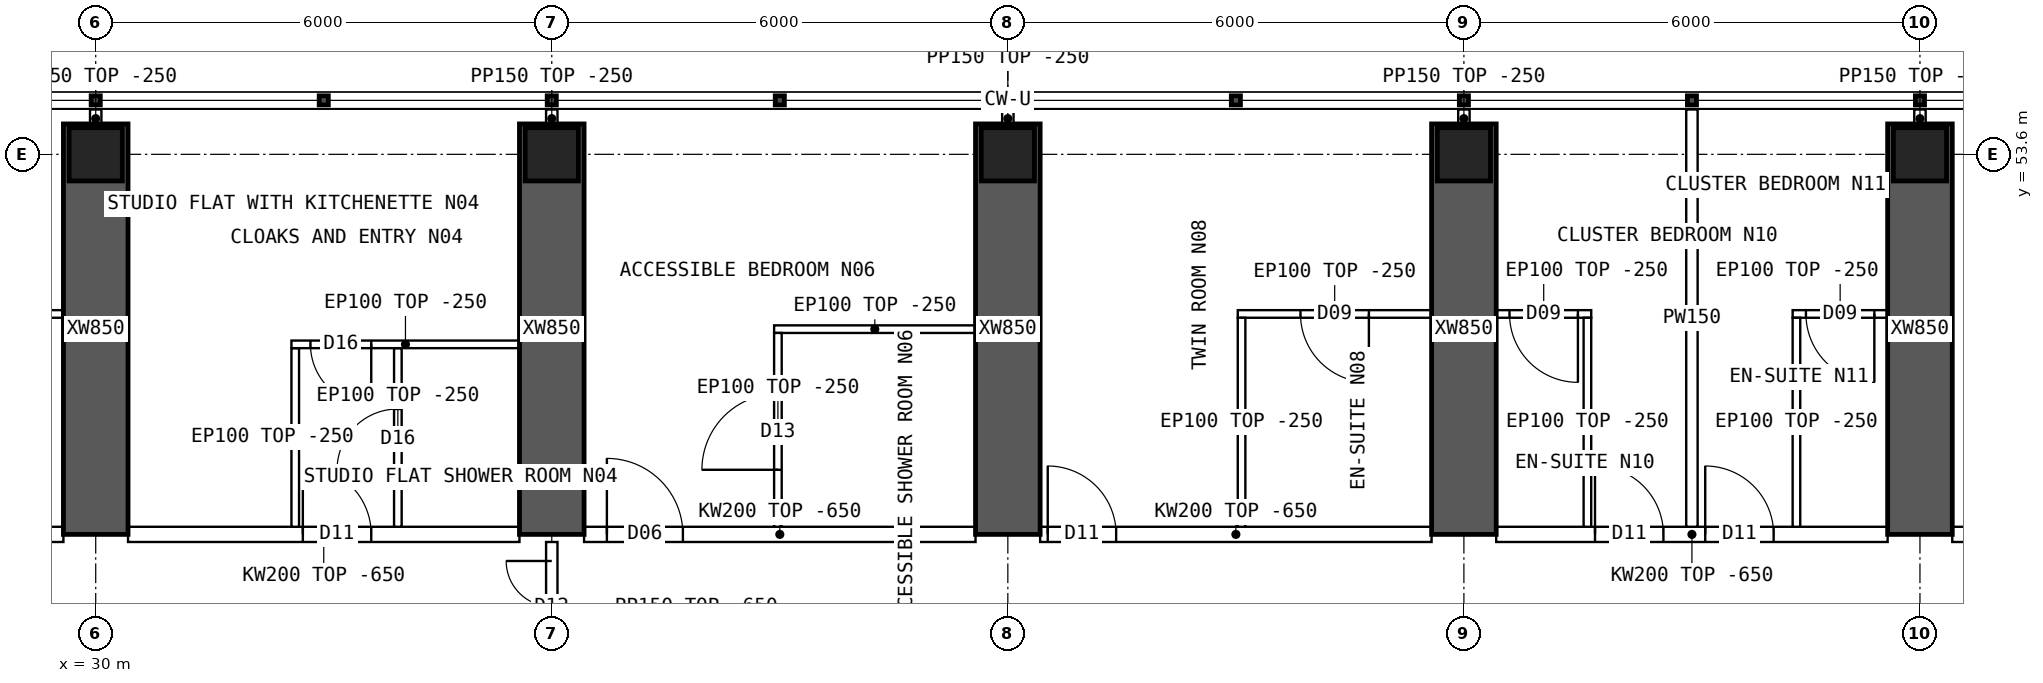
"""IFC4 building model, lengths in metres.
Left out: names, types, materials, properties, quantities, classifications, styles, units other than length and angle.
Written with IfcOpenShell. Run it as: python <this file> out.ifc"""

import sys

from ifc_helpers import new_model, si_unit, direction, frame, frame_2d, origin, origin_2d, place, context, subcontext, project, spatial, polyline, rectangle, hollow_rectangle, outline, extrude, element, fill, save


model = new_model("IFC4")
c1 = context("Model", 3, precision=1e-05, world=origin(), true_north=direction((0.0, 1.0)))
c2 = subcontext(c1, "Body", "Model", "MODEL_VIEW")
j1 = project(units=[si_unit("LENGTHUNIT", "METRE"), si_unit("PLANEANGLEUNIT", "RADIAN")], contexts=[c1])
p1 = place(None, origin())
s1 = spatial("IfcSite", under=j1, at=p1, CompositionType="ELEMENT")
p2 = place(p1, origin())
s2 = spatial("IfcBuilding", under=s1, at=p2, CompositionType="ELEMENT")
p3 = place(p2, frame((0.0, 0.0, 171.1)))
s3 = spatial("IfcBuildingStorey", under=s2, at=p3, CompositionType="ELEMENT", Elevation=171.1)
for number, where, z_axis, x_axis in (
    (1, (30.0, 53.6, 0.0), (0.0, 0.0, 1.0), (1.0, 0.0, 0.0)),
    (2, (36.0, 53.6, 0.0), (0.0, 0.0, 1.0), (1.0, 0.0, 0.0)),
    (3, (42.0, 53.6, 0.0), (0.0, 0.0, 1.0), (1.0, 0.0, 0.0)),
    (4, (48.0, 53.6, 0.0), (0.0, 0.0, 1.0), (1.0, 0.0, 0.0)),
    (5, (54.0, 53.6, 0.0), (0.0, 0.0, 1.0), (1.0, 0.0, 0.0)),
):
    element("IfcColumn", number, at=place(p3, frame(where, z_axis=z_axis, x_axis=x_axis)), inside=s3, PredefinedType="COLUMN", context=c2, shape_type="SweptSolid", body=[
        extrude(hollow_rectangle(XDim=0.7, YDim=0.7, WallThickness=0.07, at=origin_2d()), origin(), (0.0, 0.0, 1.0), 3.75),
    ])
for number, where, z_axis, x_axis in (
    (6, (30.0, 48.6, 0.0), (0.0, 0.0, 1.0), (0.0, 1.0, 0.0)),
    (7, (36.0, 48.6, 0.0), (0.0, 0.0, 1.0), (0.0, 1.0, 0.0)),
    (8, (42.0, 48.6, 0.0), (0.0, 0.0, 1.0), (0.0, 1.0, 0.0)),
    (9, (48.0, 48.6, 0.0), (0.0, 0.0, 1.0), (0.0, 1.0, 0.0)),
    (10, (54.0, 48.6, 0.0), (0.0, 0.0, 1.0), (0.0, 1.0, 0.0)),
):
    element("IfcWall", number, at=place(p3, frame(where, z_axis=z_axis, x_axis=x_axis)), inside=s3, PredefinedType="SHEAR", context=c2, shape_type="SweptSolid", body=[
        extrude(rectangle(XDim=5.4, YDim=0.85, at=frame_2d((2.7, 0.0))), origin(), (0.0, 0.0, 1.0), 3.75),
    ])
p4 = place(p3, frame((24.425, 48.6, 0.0), z_axis=(0.0, 0.0, 1.0), x_axis=(1.0, 0.0, 0.0)))
e11 = element("IfcWall", 11, at=p4, inside=s3, PredefinedType="SOLIDWALL", context=c2, shape_type="SweptSolid", body=[
    extrude(outline(polyline([(0.0, 0.0), (5.15, 0.0), (5.15, 3.1), (0.0, 3.1), (0.0, 0.0)])), frame((0.0, 0.1, 0.0), z_axis=(0.0, -1.0, 0.0), x_axis=(1.0, 0.0, 0.0)), (0.0, 0.0, 1.0), 0.2),
])
p5 = place(p4, frame((0.1, 0.0, 0.0)))
e12 = element("IfcOpeningElement", 12, at=p5, cuts=e11, PredefinedType="OPENING", context=c2, shape_type="SweptSolid", body=[
    extrude(rectangle(XDim=0.9, YDim=2.1, at=frame_2d((0.45, 1.05))), frame((0.0, 0.11, 0.0), z_axis=(0.0, -1.0, 0.0), x_axis=(1.0, 0.0, 0.0)), (0.0, 0.0, 1.0), 0.22),
])
p6 = place(p3, frame((30.425, 48.6, 0.0), z_axis=(0.0, 0.0, 1.0), x_axis=(1.0, 0.0, 0.0)))
e13 = element("IfcWall", 13, at=p6, inside=s3, PredefinedType="SOLIDWALL", context=c2, shape_type="SweptSolid", body=[
    extrude(outline(polyline([(0.0, 0.0), (5.15, 0.0), (5.15, 3.1), (0.0, 3.1), (0.0, 0.0)])), frame((0.0, 0.1, 0.0), z_axis=(0.0, -1.0, 0.0), x_axis=(1.0, 0.0, 0.0)), (0.0, 0.0, 1.0), 0.2),
])
p7 = place(p6, frame((2.3, 0.0, 0.0)))
e14 = element("IfcOpeningElement", 14, at=p7, cuts=e13, PredefinedType="OPENING", context=c2, shape_type="SweptSolid", body=[
    extrude(rectangle(XDim=0.9, YDim=2.1, at=frame_2d((0.45, 1.05))), frame((0.0, 0.11, 0.0), z_axis=(0.0, -1.0, 0.0), x_axis=(1.0, 0.0, 0.0)), (0.0, 0.0, 1.0), 0.22),
])
p8 = place(p3, frame((36.425, 48.6, 0.0), z_axis=(0.0, 0.0, 1.0), x_axis=(1.0, 0.0, 0.0)))
e15 = element("IfcWall", 15, at=p8, inside=s3, PredefinedType="SOLIDWALL", context=c2, shape_type="SweptSolid", body=[
    extrude(outline(polyline([(0.0, 0.0), (5.15, 0.0), (5.15, 3.1), (0.0, 3.1), (0.0, 0.0)])), frame((0.0, 0.1, 0.0), z_axis=(0.0, -1.0, 0.0), x_axis=(1.0, 0.0, 0.0)), (0.0, 0.0, 1.0), 0.2),
])
p9 = place(p8, frame((0.3, 0.0, 0.0)))
e16 = element("IfcOpeningElement", 16, at=p9, cuts=e15, PredefinedType="OPENING", context=c2, shape_type="SweptSolid", body=[
    extrude(rectangle(XDim=1.0, YDim=2.1, at=frame_2d((0.5, 1.05))), frame((0.0, 0.11, 0.0), z_axis=(0.0, -1.0, 0.0), x_axis=(1.0, 0.0, 0.0)), (0.0, 0.0, 1.0), 0.22),
])
p10 = place(p3, frame((42.425, 48.6, 0.0), z_axis=(0.0, 0.0, 1.0), x_axis=(1.0, 0.0, 0.0)))
e17 = element("IfcWall", 17, at=p10, inside=s3, PredefinedType="SOLIDWALL", context=c2, shape_type="SweptSolid", body=[
    extrude(outline(polyline([(0.0, 0.0), (5.15, 0.0), (5.15, 3.1), (0.0, 3.1), (0.0, 0.0)])), frame((0.0, 0.1, 0.0), z_axis=(0.0, -1.0, 0.0), x_axis=(1.0, 0.0, 0.0)), (0.0, 0.0, 1.0), 0.2),
])
p11 = place(p10, frame((0.1, 0.0, 0.0)))
e18 = element("IfcOpeningElement", 18, at=p11, cuts=e17, PredefinedType="OPENING", context=c2, shape_type="SweptSolid", body=[
    extrude(rectangle(XDim=0.9, YDim=2.1, at=frame_2d((0.45, 1.05))), frame((0.0, 0.11, 0.0), z_axis=(0.0, -1.0, 0.0), x_axis=(1.0, 0.0, 0.0)), (0.0, 0.0, 1.0), 0.22),
])
p12 = place(p3, frame((48.425, 48.6, 0.0), z_axis=(0.0, 0.0, 1.0), x_axis=(1.0, 0.0, 0.0)))
e19 = element("IfcWall", 19, at=p12, inside=s3, PredefinedType="SOLIDWALL", context=c2, shape_type="SweptSolid", body=[
    extrude(outline(polyline([(0.0, 0.0), (5.15, 0.0), (5.15, 3.1), (0.0, 3.1), (0.0, 0.0)])), frame((0.0, 0.1, 0.0), z_axis=(0.0, -1.0, 0.0), x_axis=(1.0, 0.0, 0.0)), (0.0, 0.0, 1.0), 0.2),
])
p13 = place(p12, frame((1.3, 0.0, 0.0)))
e20 = element("IfcOpeningElement", 20, at=p13, cuts=e19, PredefinedType="OPENING", context=c2, shape_type="SweptSolid", body=[
    extrude(rectangle(XDim=0.9, YDim=2.1, at=frame_2d((0.45, 1.05))), frame((0.0, 0.11, 0.0), z_axis=(0.0, -1.0, 0.0), x_axis=(1.0, 0.0, 0.0)), (0.0, 0.0, 1.0), 0.22),
])
p14 = place(p12, frame((2.75, 0.0, 0.0)))
e21 = element("IfcOpeningElement", 21, at=p14, cuts=e19, PredefinedType="OPENING", context=c2, shape_type="SweptSolid", body=[
    extrude(rectangle(XDim=0.9, YDim=2.1, at=frame_2d((0.45, 1.05))), frame((0.0, 0.11, 0.0), z_axis=(0.0, -1.0, 0.0), x_axis=(1.0, 0.0, 0.0)), (0.0, 0.0, 1.0), 0.22),
])
p15 = place(p3, frame((54.425, 48.6, 0.0), z_axis=(0.0, 0.0, 1.0), x_axis=(1.0, 0.0, 0.0)))
e22 = element("IfcWall", 22, at=p15, inside=s3, PredefinedType="SOLIDWALL", context=c2, shape_type="SweptSolid", body=[
    extrude(outline(polyline([(0.0, 0.0), (5.15, 0.0), (5.15, 3.1), (0.0, 3.1), (0.0, 0.0)])), frame((0.0, 0.1, 0.0), z_axis=(0.0, -1.0, 0.0), x_axis=(1.0, 0.0, 0.0)), (0.0, 0.0, 1.0), 0.2),
])
p16 = place(p15, frame((0.6, 0.0, 0.0)))
e23 = element("IfcOpeningElement", 23, at=p16, cuts=e22, PredefinedType="OPENING", context=c2, shape_type="SweptSolid", body=[
    extrude(rectangle(XDim=1.0, YDim=2.1, at=frame_2d((0.5, 1.05))), frame((0.0, 0.11, 0.0), z_axis=(0.0, -1.0, 0.0), x_axis=(1.0, 0.0, 0.0)), (0.0, 0.0, 1.0), 0.22),
])
p17 = place(p3, frame((27.025, 51.5, 0.0), z_axis=(0.0, 0.0, 1.0), x_axis=(1.0, 0.0, 0.0)))
e24 = element("IfcWall", 24, at=p17, inside=s3, PredefinedType="PARTITIONING", context=c2, shape_type="SweptSolid", body=[
    extrude(rectangle(XDim=2.55, YDim=0.1, at=frame_2d((1.275, 0.0))), origin(), (0.0, 0.0, 1.0), 3.5),
])
p18 = place(p17, frame((0.825, 0.0, 0.0)))
e25 = element("IfcOpeningElement", 25, at=p18, cuts=e24, PredefinedType="OPENING", context=c2, shape_type="SweptSolid", body=[
    extrude(rectangle(XDim=0.9, YDim=2.1, at=frame_2d((0.45, 1.05))), frame((0.0, 0.06, 0.0), z_axis=(0.0, -1.0, 0.0), x_axis=(1.0, 0.0, 0.0)), (0.0, 0.0, 1.0), 0.12),
])
p19 = place(p3, frame((32.575, 51.1, 0.0), z_axis=(0.0, 0.0, 1.0), x_axis=(1.0, 0.0, 0.0)))
e26 = element("IfcWall", 26, at=p19, inside=s3, PredefinedType="PARTITIONING", context=c2, shape_type="SweptSolid", body=[
    extrude(rectangle(XDim=3.0, YDim=0.1, at=frame_2d((1.5, 0.0))), origin(), (0.0, 0.0, 1.0), 3.5),
])
p20 = place(p19, frame((0.25, 0.0, 0.0)))
e27 = element("IfcOpeningElement", 27, at=p20, cuts=e26, PredefinedType="OPENING", context=c2, shape_type="SweptSolid", body=[
    extrude(rectangle(XDim=0.8, YDim=2.1, at=frame_2d((0.4, 1.05))), frame((0.0, 0.06, 0.0), z_axis=(0.0, -1.0, 0.0), x_axis=(1.0, 0.0, 0.0)), (0.0, 0.0, 1.0), 0.12),
])
p21 = place(p3, frame((32.625, 51.05, 0.0), z_axis=(0.0, 0.0, 1.0), x_axis=(0.0, -1.0, 0.0)))
e28 = element("IfcWall", 28, at=p21, inside=s3, PredefinedType="PARTITIONING", context=c2, shape_type="SweptSolid", body=[
    extrude(outline(polyline([(0.0, 0.0), (2.35, 0.0), (2.35, 3.1), (2.302, 3.1), (2.3, 3.5), (0.0, 3.5), (0.0, 0.0)])), frame((0.0, 0.05, 0.0), z_axis=(0.0, -1.0, 0.0), x_axis=(1.0, 0.0, 0.0)), (0.0, 0.0, 1.0), 0.1),
])
p22 = place(p3, frame((33.975, 51.05, 0.0), z_axis=(0.0, 0.0, 1.0), x_axis=(0.0, -1.0, 0.0)))
e29 = element("IfcWall", 29, at=p22, inside=s3, PredefinedType="PARTITIONING", context=c2, shape_type="SweptSolid", body=[
    extrude(outline(polyline([(0.0, 0.0), (2.35, 0.0), (2.35, 3.1), (2.302, 3.1), (2.3, 3.5), (0.0, 3.5), (0.0, 0.0)])), frame((0.0, 0.05, 0.0), z_axis=(0.0, -1.0, 0.0), x_axis=(1.0, 0.0, 0.0)), (0.0, 0.0, 1.0), 0.1),
])
p23 = place(p22, frame((0.8, 0.0, 0.0)))
e30 = element("IfcOpeningElement", 30, at=p23, cuts=e29, PredefinedType="OPENING", context=c2, shape_type="SweptSolid", body=[
    extrude(rectangle(XDim=0.8, YDim=2.1, at=frame_2d((0.4, 1.05))), frame((0.0, 0.06, 0.0), z_axis=(0.0, -1.0, 0.0), x_axis=(1.0, 0.0, 0.0)), (0.0, 0.0, 1.0), 0.12),
])
p24 = place(p3, frame((38.925, 51.3, 0.0), z_axis=(0.0, 0.0, 1.0), x_axis=(1.0, 0.0, 0.0)))
e31 = element("IfcWall", 31, at=p24, inside=s3, PredefinedType="PARTITIONING", context=c2, shape_type="SweptSolid", body=[
    extrude(rectangle(XDim=2.65, YDim=0.1, at=frame_2d((1.325, 0.0))), origin(), (0.0, 0.0, 1.0), 3.5),
])
p25 = place(p3, frame((38.975, 51.25, 0.0), z_axis=(0.0, 0.0, 1.0), x_axis=(0.0, -1.0, 0.0)))
e32 = element("IfcWall", 32, at=p25, inside=s3, PredefinedType="PARTITIONING", context=c2, shape_type="SweptSolid", body=[
    extrude(outline(polyline([(0.0, 0.0), (2.55, 0.0), (2.55, 3.1), (2.502, 3.1), (2.5, 3.5), (0.0, 3.5), (0.0, 0.0)])), frame((0.0, 0.05, 0.0), z_axis=(0.0, -1.0, 0.0), x_axis=(1.0, 0.0, 0.0)), (0.0, 0.0, 1.0), 0.1),
])
p26 = place(p25, frame((0.8, 0.0, 0.0)))
e33 = element("IfcOpeningElement", 33, at=p26, cuts=e32, PredefinedType="OPENING", context=c2, shape_type="SweptSolid", body=[
    extrude(rectangle(XDim=1.0, YDim=2.1, at=frame_2d((0.5, 1.05))), frame((0.0, 0.06, 0.0), z_axis=(0.0, -1.0, 0.0), x_axis=(1.0, 0.0, 0.0)), (0.0, 0.0, 1.0), 0.12),
])
p27 = place(p3, frame((45.025, 51.5, 0.0), z_axis=(0.0, 0.0, 1.0), x_axis=(1.0, 0.0, 0.0)))
e34 = element("IfcWall", 34, at=p27, inside=s3, PredefinedType="PARTITIONING", context=c2, shape_type="SweptSolid", body=[
    extrude(rectangle(XDim=2.55, YDim=0.1, at=frame_2d((1.275, 0.0))), origin(), (0.0, 0.0, 1.0), 3.5),
])
p28 = place(p27, frame((0.825, 0.0, 0.0)))
e35 = element("IfcOpeningElement", 35, at=p28, cuts=e34, PredefinedType="OPENING", context=c2, shape_type="SweptSolid", body=[
    extrude(rectangle(XDim=0.9, YDim=2.1, at=frame_2d((0.45, 1.05))), frame((0.0, 0.06, 0.0), z_axis=(0.0, -1.0, 0.0), x_axis=(1.0, 0.0, 0.0)), (0.0, 0.0, 1.0), 0.12),
])
p29 = place(p3, frame((45.075, 51.45, 0.0), z_axis=(0.0, 0.0, 1.0), x_axis=(0.0, -1.0, 0.0)))
e36 = element("IfcWall", 36, at=p29, inside=s3, PredefinedType="PARTITIONING", context=c2, shape_type="SweptSolid", body=[
    extrude(outline(polyline([(0.0, 0.0), (2.75, 0.0), (2.75, 3.1), (2.702, 3.1), (2.7, 3.5), (0.0, 3.5), (0.0, 0.0)])), frame((0.0, 0.05, 0.0), z_axis=(0.0, -1.0, 0.0), x_axis=(1.0, 0.0, 0.0)), (0.0, 0.0, 1.0), 0.1),
])
p30 = place(p3, frame((51.0, 54.19, 0.0), z_axis=(0.0, 0.0, 1.0), x_axis=(0.0, -1.0, 0.0)))
e37 = element("IfcWall", 37, at=p30, inside=s3, PredefinedType="PARTITIONING", context=c2, shape_type="SweptSolid", body=[
    extrude(outline(polyline([(0.0, 0.0), (5.49, 0.0), (5.49, 3.1), (5.442, 3.1), (5.44, 3.5), (0.792, 3.5), (0.79, 3.1), (0.392, 3.1), (0.39, 3.5), (0.0, 3.5), (0.0, 0.0)])), frame((0.0, 0.075, 0.0), z_axis=(0.0, -1.0, 0.0), x_axis=(1.0, 0.0, 0.0)), (0.0, 0.0, 1.0), 0.15),
])
p31 = place(p3, frame((48.425, 51.5, 0.0), z_axis=(0.0, 0.0, 1.0), x_axis=(1.0, 0.0, 0.0)))
e38 = element("IfcWall", 38, at=p31, inside=s3, PredefinedType="PARTITIONING", context=c2, shape_type="SweptSolid", body=[
    extrude(rectangle(XDim=1.25, YDim=0.1, at=frame_2d((0.625, 0.0))), origin(), (0.0, 0.0, 1.0), 3.5),
])
p32 = place(p31, frame((0.175, 0.0, 0.0)))
e39 = element("IfcOpeningElement", 39, at=p32, cuts=e38, PredefinedType="OPENING", context=c2, shape_type="SweptSolid", body=[
    extrude(rectangle(XDim=0.9, YDim=2.1, at=frame_2d((0.45, 1.05))), frame((0.0, 0.06, 0.0), z_axis=(0.0, -1.0, 0.0), x_axis=(1.0, 0.0, 0.0)), (0.0, 0.0, 1.0), 0.12),
])
p33 = place(p3, frame((49.625, 51.45, 0.0), z_axis=(0.0, 0.0, 1.0), x_axis=(0.0, -1.0, 0.0)))
e40 = element("IfcWall", 40, at=p33, inside=s3, PredefinedType="PARTITIONING", context=c2, shape_type="SweptSolid", body=[
    extrude(outline(polyline([(0.0, 0.0), (2.75, 0.0), (2.75, 3.1), (2.702, 3.1), (2.7, 3.5), (0.0, 3.5), (0.0, 0.0)])), frame((0.0, 0.05, 0.0), z_axis=(0.0, -1.0, 0.0), x_axis=(1.0, 0.0, 0.0)), (0.0, 0.0, 1.0), 0.1),
])
p34 = place(p3, frame((52.325, 51.5, 0.0), z_axis=(0.0, 0.0, 1.0), x_axis=(1.0, 0.0, 0.0)))
e41 = element("IfcWall", 41, at=p34, inside=s3, PredefinedType="PARTITIONING", context=c2, shape_type="SweptSolid", body=[
    extrude(rectangle(XDim=1.25, YDim=0.1, at=frame_2d((0.625, 0.0))), origin(), (0.0, 0.0, 1.0), 3.5),
])
p35 = place(p34, frame((0.175, 0.0, 0.0)))
e42 = element("IfcOpeningElement", 42, at=p35, cuts=e41, PredefinedType="OPENING", context=c2, shape_type="SweptSolid", body=[
    extrude(rectangle(XDim=0.9, YDim=2.1, at=frame_2d((0.45, 1.05))), frame((0.0, 0.06, 0.0), z_axis=(0.0, -1.0, 0.0), x_axis=(1.0, 0.0, 0.0)), (0.0, 0.0, 1.0), 0.12),
])
p36 = place(p3, frame((52.375, 51.45, 0.0), z_axis=(0.0, 0.0, 1.0), x_axis=(0.0, -1.0, 0.0)))
e43 = element("IfcWall", 43, at=p36, inside=s3, PredefinedType="PARTITIONING", context=c2, shape_type="SweptSolid", body=[
    extrude(outline(polyline([(0.0, 0.0), (2.75, 0.0), (2.75, 3.1), (2.702, 3.1), (2.7, 3.5), (0.0, 3.5), (0.0, 0.0)])), frame((0.0, 0.05, 0.0), z_axis=(0.0, -1.0, 0.0), x_axis=(1.0, 0.0, 0.0)), (0.0, 0.0, 1.0), 0.1),
])
p37 = place(p3, frame((36.0, 46.8, 0.0), z_axis=(0.0, 0.0, 1.0), x_axis=(0.0, 1.0, 0.0)))
e44 = element("IfcWall", 44, at=p37, inside=s3, PredefinedType="PARTITIONING", context=c2, shape_type="SweptSolid", body=[
    extrude(outline(polyline([(0.0, 0.0), (1.7, 0.0), (1.7, 3.1), (0.0, 3.1), (0.0, 0.0)])), frame((0.0, 0.075, 0.0), z_axis=(0.0, -1.0, 0.0), x_axis=(1.0, 0.0, 0.0)), (0.0, 0.0, 1.0), 0.15),
])
p38 = place(p37, frame((0.25, 0.0, 0.0)))
e45 = element("IfcOpeningElement", 45, at=p38, cuts=e44, PredefinedType="OPENING", context=c2, shape_type="SweptSolid", body=[
    extrude(rectangle(XDim=1.2, YDim=2.1, at=frame_2d((0.6, 1.05))), frame((0.0, 0.085, 0.0), z_axis=(0.0, -1.0, 0.0), x_axis=(1.0, 0.0, 0.0)), (0.0, 0.0, 1.0), 0.17),
])
for number, where, z_axis, x_axis in (
    (46, (30.0, 53.95, 0.0), (0.0, 0.0, 1.0), (0.0, 1.0, 0.0)),
    (47, (36.0, 53.95, 0.0), (0.0, 0.0, 1.0), (0.0, 1.0, 0.0)),
    (48, (42.0, 53.95, 0.0), (0.0, 0.0, 1.0), (0.0, 1.0, 0.0)),
    (49, (48.0, 53.95, 0.0), (0.0, 0.0, 1.0), (0.0, 1.0, 0.0)),
    (50, (54.0, 53.95, 0.0), (0.0, 0.0, 1.0), (0.0, 1.0, 0.0)),
):
    element("IfcWall", number, at=place(p3, frame(where, z_axis=z_axis, x_axis=x_axis)), inside=s3, PredefinedType="PARTITIONING", context=c2, shape_type="SweptSolid", body=[
        extrude(rectangle(XDim=0.24, YDim=0.15, at=frame_2d((0.12, 0.0))), origin(), (0.0, 0.0, 1.0), 3.5),
    ])
p39 = place(p20, origin())
e51 = element("IfcDoor", 51, at=p39, inside=s3, OperationType="SINGLE_SWING_RIGHT", PredefinedType="DOOR", context=c2, shape_type="SweptSolid", body=[
    extrude(rectangle(XDim=0.8, YDim=2.1, at=frame_2d((0.4, 1.05))), frame((0.0, 0.025, 0.0), z_axis=(0.0, -1.0, 0.0), x_axis=(1.0, 0.0, 0.0)), (0.0, 0.0, 1.0), 0.05),
])
fill(e27, e51)
p40 = place(p23, origin())
e52 = element("IfcDoor", 52, at=p40, inside=s3, OperationType="SINGLE_SWING_RIGHT", PredefinedType="DOOR", context=c2, shape_type="SweptSolid", body=[
    extrude(rectangle(XDim=0.8, YDim=2.1, at=frame_2d((0.4, 1.05))), frame((0.0, 0.025, 0.0), z_axis=(0.0, -1.0, 0.0), x_axis=(1.0, 0.0, 0.0)), (0.0, 0.0, 1.0), 0.05),
])
fill(e30, e52)
p41 = place(p7, origin())
e53 = element("IfcDoor", 53, at=p41, inside=s3, OperationType="SINGLE_SWING_LEFT", PredefinedType="DOOR", context=c2, shape_type="SweptSolid", body=[
    extrude(rectangle(XDim=0.9, YDim=2.1, at=frame_2d((0.45, 1.05))), frame((0.0, 0.025, 0.0), z_axis=(0.0, -1.0, 0.0), x_axis=(1.0, 0.0, 0.0)), (0.0, 0.0, 1.0), 0.05),
])
fill(e14, e53)
p42 = place(p26, origin())
e54 = element("IfcDoor", 54, at=p42, inside=s3, OperationType="SINGLE_SWING_RIGHT", PredefinedType="DOOR", context=c2, shape_type="SweptSolid", body=[
    extrude(rectangle(XDim=1.0, YDim=2.1, at=frame_2d((0.5, 1.05))), frame((0.0, 0.025, 0.0), z_axis=(0.0, -1.0, 0.0), x_axis=(1.0, 0.0, 0.0)), (0.0, 0.0, 1.0), 0.05),
])
fill(e33, e54)
p43 = place(p9, origin())
e55 = element("IfcDoor", 55, at=p43, inside=s3, OperationType="SINGLE_SWING_LEFT", PredefinedType="DOOR", context=c2, shape_type="SweptSolid", body=[
    extrude(rectangle(XDim=1.0, YDim=2.1, at=frame_2d((0.5, 1.05))), frame((0.0, 0.025, 0.0), z_axis=(0.0, -1.0, 0.0), x_axis=(1.0, 0.0, 0.0)), (0.0, 0.0, 1.0), 0.05),
])
fill(e16, e55)
p44 = place(p28, origin())
e56 = element("IfcDoor", 56, at=p44, inside=s3, OperationType="SINGLE_SWING_RIGHT", PredefinedType="DOOR", context=c2, shape_type="SweptSolid", body=[
    extrude(rectangle(XDim=0.9, YDim=2.1, at=frame_2d((0.45, 1.05))), frame((0.0, 0.025, 0.0), z_axis=(0.0, -1.0, 0.0), x_axis=(1.0, 0.0, 0.0)), (0.0, 0.0, 1.0), 0.05),
])
fill(e35, e56)
p45 = place(p11, origin())
e57 = element("IfcDoor", 57, at=p45, inside=s3, OperationType="SINGLE_SWING_LEFT", PredefinedType="DOOR", context=c2, shape_type="SweptSolid", body=[
    extrude(rectangle(XDim=0.9, YDim=2.1, at=frame_2d((0.45, 1.05))), frame((0.0, 0.025, 0.0), z_axis=(0.0, -1.0, 0.0), x_axis=(1.0, 0.0, 0.0)), (0.0, 0.0, 1.0), 0.05),
])
fill(e18, e57)
p46 = place(p32, origin())
e58 = element("IfcDoor", 58, at=p46, inside=s3, OperationType="SINGLE_SWING_RIGHT", PredefinedType="DOOR", context=c2, shape_type="SweptSolid", body=[
    extrude(rectangle(XDim=0.9, YDim=2.1, at=frame_2d((0.45, 1.05))), frame((0.0, 0.025, 0.0), z_axis=(0.0, -1.0, 0.0), x_axis=(1.0, 0.0, 0.0)), (0.0, 0.0, 1.0), 0.05),
])
fill(e39, e58)
p47 = place(p13, origin())
e59 = element("IfcDoor", 59, at=p47, inside=s3, OperationType="SINGLE_SWING_LEFT", PredefinedType="DOOR", context=c2, shape_type="SweptSolid", body=[
    extrude(rectangle(XDim=0.9, YDim=2.1, at=frame_2d((0.45, 1.05))), frame((0.0, 0.025, 0.0), z_axis=(0.0, -1.0, 0.0), x_axis=(1.0, 0.0, 0.0)), (0.0, 0.0, 1.0), 0.05),
])
fill(e20, e59)
p48 = place(p35, origin())
e60 = element("IfcDoor", 60, at=p48, inside=s3, OperationType="SINGLE_SWING_RIGHT", PredefinedType="DOOR", context=c2, shape_type="SweptSolid", body=[
    extrude(rectangle(XDim=0.9, YDim=2.1, at=frame_2d((0.45, 1.05))), frame((0.0, 0.025, 0.0), z_axis=(0.0, -1.0, 0.0), x_axis=(1.0, 0.0, 0.0)), (0.0, 0.0, 1.0), 0.05),
])
fill(e42, e60)
p49 = place(p14, origin())
e61 = element("IfcDoor", 61, at=p49, inside=s3, OperationType="SINGLE_SWING_LEFT", PredefinedType="DOOR", context=c2, shape_type="SweptSolid", body=[
    extrude(rectangle(XDim=0.9, YDim=2.1, at=frame_2d((0.45, 1.05))), frame((0.0, 0.025, 0.0), z_axis=(0.0, -1.0, 0.0), x_axis=(1.0, 0.0, 0.0)), (0.0, 0.0, 1.0), 0.05),
])
fill(e21, e61)
p50 = place(p38, origin())
e62 = element("IfcDoor", 62, at=p50, inside=s3, OperationType="DOUBLE_DOOR_SINGLE_SWING", PredefinedType="DOOR", context=c2, shape_type="SweptSolid", body=[
    extrude(rectangle(XDim=1.2, YDim=2.1, at=frame_2d((0.6, 1.05))), frame((0.0, 0.025, 0.0), z_axis=(0.0, -1.0, 0.0), x_axis=(1.0, 0.0, 0.0)), (0.0, 0.0, 1.0), 0.05),
])
fill(e45, e62)
save(model, sys.argv[1])
